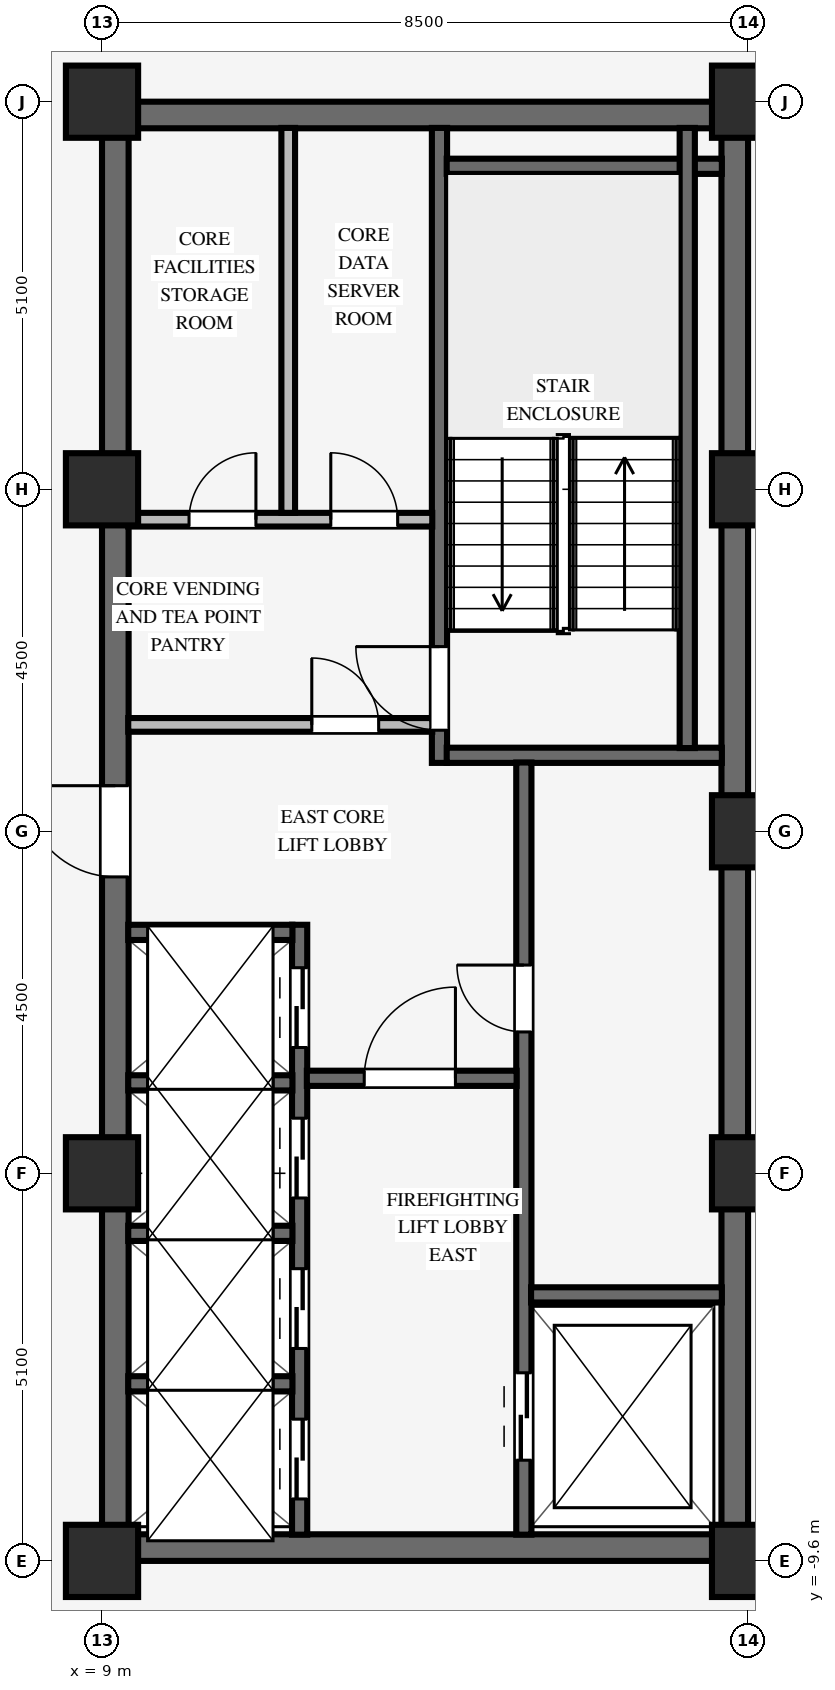
"""IFC4 building model, lengths in metres.
Left out: names, types, materials, properties, quantities, classifications, styles, units other than length and angle.
Written with IfcOpenShell. Run it as: python <this file> out.ifc"""

import sys

from ifc_helpers import new_model, si_unit, direction, frame, frame_2d, origin, origin_2d, place, context, subcontext, project, spatial, rectangle, extrude, source, transform, mapped, element, fill, save


model = new_model("IFC4")
c1 = context("Model", 3, precision=1e-05, world=origin(), true_north=direction((0.0, 1.0)))
c2 = subcontext(c1, "Body", "Model", "MODEL_VIEW")
j1 = project(units=[si_unit("LENGTHUNIT", "METRE"), si_unit("PLANEANGLEUNIT", "RADIAN")], contexts=[c1])
p1 = place(None, origin())
s1 = spatial("IfcSite", under=j1, at=p1, CompositionType="ELEMENT")
p2 = place(p1, origin())
s2 = spatial("IfcBuilding", under=s1, at=p2, CompositionType="ELEMENT")
p3 = place(p2, frame((0.0, 0.0, 201.85)))
s3 = spatial("IfcBuildingStorey", under=s2, at=p3, CompositionType="ELEMENT", Elevation=201.85)
for number, where, z_axis, x_axis in (
    (1, (9.0, -9.425, 0.0), (0.0, 0.0, 1.0), (1.0, 0.0, 0.0)),
    (2, (9.0, 9.425, 0.0), (0.0, 0.0, 1.0), (1.0, 0.0, 0.0)),
):
    element("IfcWall", number, at=place(p3, frame(where, z_axis=z_axis, x_axis=x_axis)), inside=s3, PredefinedType="SHEAR", context=c2, shape_type="SweptSolid", body=[
        extrude(rectangle(XDim=8.5, YDim=0.35, at=frame_2d((4.25, 0.0))), origin(), (0.0, 0.0, 1.0), 3.37),
    ])
p4 = place(p3, frame((9.175, -9.255, 0.0), z_axis=(0.0, 0.0, 1.0), x_axis=(0.0, 1.0, 0.0)))
e3 = element("IfcWall", 3, at=p4, inside=s3, PredefinedType="SHEAR", context=c2, shape_type="SweptSolid", body=[
    extrude(rectangle(XDim=18.51, YDim=0.35, at=frame_2d((9.255, 0.0))), origin(), (0.0, 0.0, 1.0), 3.37),
])
p5 = place(p4, frame((8.655, 0.0, 0.0)))
e4 = element("IfcOpeningElement", 4, at=p5, cuts=e3, PredefinedType="OPENING", context=c2, shape_type="SweptSolid", body=[
    extrude(rectangle(XDim=1.2, YDim=2.15, at=frame_2d((0.6, 1.075))), frame((0.0, 0.185, 0.0), z_axis=(0.0, -1.0, 0.0), x_axis=(1.0, 0.0, 0.0)), (0.0, 0.0, 1.0), 0.37),
])
p6 = place(p3, frame((17.325, -9.255, 0.0), z_axis=(0.0, 0.0, 1.0), x_axis=(0.0, 1.0, 0.0)))
e5 = element("IfcWall", 5, at=p6, inside=s3, PredefinedType="SHEAR", context=c2, shape_type="SweptSolid", body=[
    extrude(rectangle(XDim=18.51, YDim=0.35, at=frame_2d((9.255, 0.0))), origin(), (0.0, 0.0, 1.0), 3.37),
])
for number, where, z_axis, x_axis in (
    (6, (9.0, -9.6, 0.0), (0.0, 0.0, 1.0), (1.0, 0.0, 0.0)),
    (7, (9.0, -4.5, 0.0), (0.0, 0.0, 1.0), (1.0, 0.0, 0.0)),
    (8, (9.0, 4.5, 0.0), (0.0, 0.0, 1.0), (1.0, 0.0, 0.0)),
    (9, (9.0, 9.6, 0.0), (0.0, 0.0, 1.0), (1.0, 0.0, 0.0)),
    (10, (17.5, -9.6, 0.0), (0.0, 0.0, 1.0), (1.0, 0.0, 0.0)),
    (11, (17.5, -4.5, 0.0), (0.0, 0.0, 1.0), (1.0, 0.0, 0.0)),
    (12, (17.5, 4.5, 0.0), (0.0, 0.0, 1.0), (1.0, 0.0, 0.0)),
    (13, (17.5, 9.6, 0.0), (0.0, 0.0, 1.0), (1.0, 0.0, 0.0)),
    (14, (17.5, 0.0, 0.0), (0.0, 0.0, 1.0), (1.0, 0.0, 0.0)),
):
    element("IfcColumn", number, at=place(p3, frame(where, z_axis=z_axis, x_axis=x_axis)), inside=s3, PredefinedType="COLUMN", context=c2, shape_type="SweptSolid", body=[
        extrude(rectangle(XDim=0.95, YDim=0.95, at=origin_2d()), origin(), (0.0, 0.0, 1.0), 3.37),
    ])
p7 = place(p3, frame((13.44, 0.9, 0.0), z_axis=(0.0, 0.0, 1.0), x_axis=(0.0, 1.0, 0.0)))
e15 = element("IfcWall", 15, at=p7, inside=s3, PredefinedType="SHEAR", context=c2, shape_type="SweptSolid", body=[
    extrude(rectangle(XDim=8.355, YDim=0.2, at=frame_2d((4.177, 0.0))), origin(), (0.0, 0.0, 1.0), 3.37),
])
p8 = place(p7, frame((0.43, 0.0, 0.0)))
e16 = element("IfcOpeningElement", 16, at=p8, cuts=e15, PredefinedType="OPENING", context=c2, shape_type="SweptSolid", body=[
    extrude(rectangle(XDim=1.1, YDim=2.15, at=frame_2d((0.55, 1.075))), frame((0.0, 0.11, 0.0), z_axis=(0.0, -1.0, 0.0), x_axis=(1.0, 0.0, 0.0)), (0.0, 0.0, 1.0), 0.22),
])
for number, where, z_axis, x_axis in (
    (17, (13.535, 1.0, 0.0), (0.0, 0.0, 1.0), (1.0, 0.0, 0.0)),
    (18, (13.535, 8.75, 0.0), (0.0, 0.0, 1.0), (1.0, 0.0, 0.0)),
):
    element("IfcWall", number, at=place(p3, frame(where, z_axis=z_axis, x_axis=x_axis)), inside=s3, PredefinedType="SHEAR", context=c2, shape_type="SweptSolid", body=[
        extrude(rectangle(XDim=3.62, YDim=0.2, at=frame_2d((1.81, 0.0))), origin(), (0.0, 0.0, 1.0), 3.37),
    ])
p9 = place(p3, frame((16.7, 1.095, 0.0), z_axis=(0.0, 0.0, 1.0), x_axis=(0.0, 1.0, 0.0)))
e19 = element("IfcWall", 19, at=p9, inside=s3, PredefinedType="SHEAR", context=c2, shape_type="SweptSolid", body=[
    extrude(rectangle(XDim=8.16, YDim=0.2, at=frame_2d((4.08, 0.0))), origin(), (0.0, 0.0, 1.0), 3.37),
])
p10 = place(p3, frame((14.55, -9.255, 0.0), z_axis=(0.0, 0.0, 1.0), x_axis=(0.0, 1.0, 0.0)))
e20 = element("IfcWall", 20, at=p10, inside=s3, PredefinedType="SHEAR", context=c2, shape_type="SweptSolid", body=[
    extrude(rectangle(XDim=10.16, YDim=0.2, at=frame_2d((5.08, 0.0))), origin(), (0.0, 0.0, 1.0), 3.37),
])
p11 = place(p10, frame((6.615, 0.0, 0.0)))
e21 = element("IfcOpeningElement", 21, at=p11, cuts=e20, PredefinedType="OPENING", context=c2, shape_type="SweptSolid", body=[
    extrude(rectangle(XDim=0.88, YDim=2.1, at=frame_2d((0.44, 1.05))), frame((0.0, 0.11, 0.0), z_axis=(0.0, -1.0, 0.0), x_axis=(1.0, 0.0, 0.0)), (0.0, 0.0, 1.0), 0.22),
])
p12 = place(p10, frame((0.98, 0.0, 0.0)))
e22 = element("IfcOpeningElement", 22, at=p12, cuts=e20, PredefinedType="OPENING", context=c2, shape_type="SweptSolid", body=[
    extrude(rectangle(XDim=1.15, YDim=2.15, at=frame_2d((0.575, 1.075))), frame((0.0, 0.11, 0.0), z_axis=(0.0, -1.0, 0.0), x_axis=(1.0, 0.0, 0.0)), (0.0, 0.0, 1.0), 0.22),
])
p13 = place(p3, frame((14.645, -6.1, 0.0), z_axis=(0.0, 0.0, 1.0), x_axis=(1.0, 0.0, 0.0)))
e23 = element("IfcWall", 23, at=p13, inside=s3, PredefinedType="SHEAR", context=c2, shape_type="SweptSolid", body=[
    extrude(rectangle(XDim=2.51, YDim=0.2, at=frame_2d((1.255, 0.0))), origin(), (0.0, 0.0, 1.0), 3.37),
])
p14 = place(p3, frame((11.6, -9.255, 0.0), z_axis=(0.0, 0.0, 1.0), x_axis=(0.0, 1.0, 0.0)))
e24 = element("IfcWall", 24, at=p14, inside=s3, PredefinedType="SHEAR", context=c2, shape_type="SweptSolid", body=[
    extrude(rectangle(XDim=8.025, YDim=0.2, at=frame_2d((4.012, 0.0))), origin(), (0.0, 0.0, 1.0), 3.37),
])
p15 = place(p14, frame((0.47, 0.0, 0.0)))
e25 = element("IfcOpeningElement", 25, at=p15, cuts=e24, PredefinedType="OPENING", context=c2, shape_type="SweptSolid", body=[
    extrude(rectangle(XDim=1.05, YDim=2.15, at=frame_2d((0.525, 1.075))), frame((0.0, 0.11, 0.0), z_axis=(0.0, -1.0, 0.0), x_axis=(1.0, 0.0, 0.0)), (0.0, 0.0, 1.0), 0.22),
])
p16 = place(p14, frame((2.45, 0.0, 0.0)))
e26 = element("IfcOpeningElement", 26, at=p16, cuts=e24, PredefinedType="OPENING", context=c2, shape_type="SweptSolid", body=[
    extrude(rectangle(XDim=1.05, YDim=2.15, at=frame_2d((0.525, 1.075))), frame((0.0, 0.11, 0.0), z_axis=(0.0, -1.0, 0.0), x_axis=(1.0, 0.0, 0.0)), (0.0, 0.0, 1.0), 0.22),
])
p17 = place(p14, frame((4.43, 0.0, 0.0)))
e27 = element("IfcOpeningElement", 27, at=p17, cuts=e24, PredefinedType="OPENING", context=c2, shape_type="SweptSolid", body=[
    extrude(rectangle(XDim=1.05, YDim=2.15, at=frame_2d((0.525, 1.075))), frame((0.0, 0.11, 0.0), z_axis=(0.0, -1.0, 0.0), x_axis=(1.0, 0.0, 0.0)), (0.0, 0.0, 1.0), 0.22),
])
p18 = place(p14, frame((6.41, 0.0, 0.0)))
e28 = element("IfcOpeningElement", 28, at=p18, cuts=e24, PredefinedType="OPENING", context=c2, shape_type="SweptSolid", body=[
    extrude(rectangle(XDim=1.05, YDim=2.15, at=frame_2d((0.525, 1.075))), frame((0.0, 0.11, 0.0), z_axis=(0.0, -1.0, 0.0), x_axis=(1.0, 0.0, 0.0)), (0.0, 0.0, 1.0), 0.22),
])
p19 = place(p3, frame((11.695, -3.25, 0.0), z_axis=(0.0, 0.0, 1.0), x_axis=(1.0, 0.0, 0.0)))
e29 = element("IfcWall", 29, at=p19, inside=s3, PredefinedType="SHEAR", context=c2, shape_type="SweptSolid", body=[
    extrude(rectangle(XDim=2.76, YDim=0.2, at=frame_2d((1.38, 0.0))), origin(), (0.0, 0.0, 1.0), 3.37),
])
p20 = place(p19, frame((0.755, 0.0, 0.0)))
e30 = element("IfcOpeningElement", 30, at=p20, cuts=e29, PredefinedType="OPENING", context=c2, shape_type="SweptSolid", body=[
    extrude(rectangle(XDim=1.2, YDim=2.15, at=frame_2d((0.6, 1.075))), frame((0.0, 0.11, 0.0), z_axis=(0.0, -1.0, 0.0), x_axis=(1.0, 0.0, 0.0)), (0.0, 0.0, 1.0), 0.22),
])
for number, where, z_axis, x_axis in (
    (31, (9.345, -7.27, 0.0), (0.0, 0.0, 1.0), (1.0, 0.0, 0.0)),
    (32, (9.345, -5.29, 0.0), (0.0, 0.0, 1.0), (1.0, 0.0, 0.0)),
    (33, (9.345, -3.31, 0.0), (0.0, 0.0, 1.0), (1.0, 0.0, 0.0)),
    (34, (9.345, -1.33, 0.0), (0.0, 0.0, 1.0), (1.0, 0.0, 0.0)),
):
    element("IfcWall", number, at=place(p3, frame(where, z_axis=z_axis, x_axis=x_axis)), inside=s3, PredefinedType="SHEAR", context=c2, shape_type="SweptSolid", body=[
        extrude(rectangle(XDim=2.16, YDim=0.2, at=frame_2d((1.08, 0.0))), origin(), (0.0, 0.0, 1.0), 3.37),
    ])
p21 = place(p3, frame((9.345, 1.4, 0.0), z_axis=(0.0, 0.0, 1.0), x_axis=(1.0, 0.0, 0.0)))
e35 = element("IfcWall", 35, at=p21, inside=s3, PredefinedType="PARTITIONING", context=c2, shape_type="SweptSolid", body=[
    extrude(rectangle(XDim=4.0, YDim=0.18, at=frame_2d((2.0, 0.0))), origin(), (0.0, 0.0, 1.0), 3.36),
])
p22 = place(p21, frame((2.415, 0.0, 0.0)))
e36 = element("IfcOpeningElement", 36, at=p22, cuts=e35, PredefinedType="OPENING", context=c2, shape_type="SweptSolid", body=[
    extrude(rectangle(XDim=0.88, YDim=2.1, at=frame_2d((0.44, 1.05))), frame((0.0, 0.1, 0.0), z_axis=(0.0, -1.0, 0.0), x_axis=(1.0, 0.0, 0.0)), (0.0, 0.0, 1.0), 0.2),
])
p23 = place(p3, frame((9.345, 4.1, 0.0), z_axis=(0.0, 0.0, 1.0), x_axis=(1.0, 0.0, 0.0)))
e37 = element("IfcWall", 37, at=p23, inside=s3, PredefinedType="PARTITIONING", context=c2, shape_type="SweptSolid", body=[
    extrude(rectangle(XDim=4.0, YDim=0.18, at=frame_2d((2.0, 0.0))), origin(), (0.0, 0.0, 1.0), 3.36),
])
p24 = place(p23, frame((0.8, 0.0, 0.0)))
e38 = element("IfcOpeningElement", 38, at=p24, cuts=e37, PredefinedType="OPENING", context=c2, shape_type="SweptSolid", body=[
    extrude(rectangle(XDim=0.88, YDim=2.1, at=frame_2d((0.44, 1.05))), frame((0.0, 0.1, 0.0), z_axis=(0.0, -1.0, 0.0), x_axis=(1.0, 0.0, 0.0)), (0.0, 0.0, 1.0), 0.2),
])
p25 = place(p23, frame((2.665, 0.0, 0.0)))
e39 = element("IfcOpeningElement", 39, at=p25, cuts=e37, PredefinedType="OPENING", context=c2, shape_type="SweptSolid", body=[
    extrude(rectangle(XDim=0.88, YDim=2.1, at=frame_2d((0.44, 1.05))), frame((0.0, 0.1, 0.0), z_axis=(0.0, -1.0, 0.0), x_axis=(1.0, 0.0, 0.0)), (0.0, 0.0, 1.0), 0.2),
])
p26 = place(p3, frame((11.45, 4.19, 0.0), z_axis=(0.0, 0.0, 1.0), x_axis=(0.0, 1.0, 0.0)))
e40 = element("IfcWall", 40, at=p26, inside=s3, PredefinedType="PARTITIONING", context=c2, shape_type="SweptSolid", body=[
    extrude(rectangle(XDim=5.065, YDim=0.18, at=frame_2d((2.532, 0.0))), origin(), (0.0, 0.0, 1.0), 3.36),
])
m1 = source(origin(), c2, "Body", "SweptSolid", [
    extrude(rectangle(XDim=1.1, YDim=2.15, at=frame_2d((0.55, 1.075))), frame((0.0, 0.025, 0.0), z_axis=(0.0, -1.0, 0.0), x_axis=(1.0, 0.0, 0.0)), (0.0, 0.0, 1.0), 0.05),
])
p27 = place(p8, origin())
e41 = element("IfcDoor", 41, at=p27, inside=s3, OperationType="SINGLE_SWING_RIGHT", PredefinedType="DOOR", context=c2, shape_type="MappedRepresentation", body=[
    mapped(m1, transform((0.0, 0.0, 0.0), scale=1.0)),
])
fill(e16, e41)
m2 = source(origin(), c2, "Body", "SweptSolid", [
    extrude(rectangle(XDim=0.88, YDim=2.1, at=frame_2d((0.44, 1.05))), frame((0.0, 0.025, 0.0), z_axis=(0.0, -1.0, 0.0), x_axis=(1.0, 0.0, 0.0)), (0.0, 0.0, 1.0), 0.05),
])
p28 = place(p11, origin())
e42 = element("IfcDoor", 42, at=p28, inside=s3, OperationType="SINGLE_SWING_RIGHT", PredefinedType="DOOR", context=c2, shape_type="MappedRepresentation", body=[
    mapped(m2, transform((0.0, 0.0, 0.0), scale=1.0)),
])
fill(e21, e42)
m3 = source(origin(), c2, "Body", "SweptSolid", [
    extrude(rectangle(XDim=1.2, YDim=2.15, at=frame_2d((0.6, 1.075))), frame((0.0, 0.025, 0.0), z_axis=(0.0, -1.0, 0.0), x_axis=(1.0, 0.0, 0.0)), (0.0, 0.0, 1.0), 0.05),
])
p29 = place(p20, origin())
e43 = element("IfcDoor", 43, at=p29, inside=s3, OperationType="SINGLE_SWING_RIGHT", PredefinedType="DOOR", context=c2, shape_type="MappedRepresentation", body=[
    mapped(m3, transform((0.0, 0.0, 0.0), scale=1.0)),
])
fill(e30, e43)
p30 = place(p5, origin())
e44 = element("IfcDoor", 44, at=p30, inside=s3, OperationType="SINGLE_SWING_RIGHT", PredefinedType="DOOR", context=c2, shape_type="MappedRepresentation", body=[
    mapped(m3, transform((0.0, 0.0, 0.0), scale=1.0)),
])
fill(e4, e44)
p31 = place(p22, origin())
e45 = element("IfcDoor", 45, at=p31, inside=s3, OperationType="SINGLE_SWING_LEFT", PredefinedType="DOOR", context=c2, shape_type="MappedRepresentation", body=[
    mapped(m2, transform((0.0, 0.0, 0.0), scale=1.0)),
])
fill(e36, e45)
p32 = place(p24, origin())
e46 = element("IfcDoor", 46, at=p32, inside=s3, OperationType="SINGLE_SWING_RIGHT", PredefinedType="DOOR", context=c2, shape_type="MappedRepresentation", body=[
    mapped(m2, transform((0.0, 0.0, 0.0), scale=1.0)),
])
fill(e38, e46)
p33 = place(p25, origin())
e47 = element("IfcDoor", 47, at=p33, inside=s3, OperationType="SINGLE_SWING_LEFT", PredefinedType="DOOR", context=c2, shape_type="MappedRepresentation", body=[
    mapped(m2, transform((0.0, 0.0, 0.0), scale=1.0)),
])
fill(e39, e47)
m4 = source(origin(), c2, "Body", "SweptSolid", [
    extrude(rectangle(XDim=1.15, YDim=2.15, at=frame_2d((0.575, 1.075))), frame((0.0, 0.025, 0.0), z_axis=(0.0, -1.0, 0.0), x_axis=(1.0, 0.0, 0.0)), (0.0, 0.0, 1.0), 0.05),
])
p34 = place(p12, origin())
e48 = element("IfcDoor", 48, at=p34, inside=s3, OperationType="DOUBLE_DOOR_SLIDING", PredefinedType="DOOR", context=c2, shape_type="MappedRepresentation", body=[
    mapped(m4, transform((0.0, 0.0, 0.0), scale=1.0)),
])
fill(e22, e48)
m5 = source(origin(), c2, "Body", "SweptSolid", [
    extrude(rectangle(XDim=1.05, YDim=2.15, at=frame_2d((0.525, 1.075))), frame((0.0, 0.025, 0.0), z_axis=(0.0, -1.0, 0.0), x_axis=(1.0, 0.0, 0.0)), (0.0, 0.0, 1.0), 0.05),
])
p35 = place(p15, origin())
e49 = element("IfcDoor", 49, at=p35, inside=s3, OperationType="DOUBLE_DOOR_SLIDING", PredefinedType="DOOR", context=c2, shape_type="MappedRepresentation", body=[
    mapped(m5, transform((0.0, 0.0, 0.0), scale=1.0)),
])
fill(e25, e49)
p36 = place(p16, origin())
e50 = element("IfcDoor", 50, at=p36, inside=s3, OperationType="DOUBLE_DOOR_SLIDING", PredefinedType="DOOR", context=c2, shape_type="MappedRepresentation", body=[
    mapped(m5, transform((0.0, 0.0, 0.0), scale=1.0)),
])
fill(e26, e50)
p37 = place(p17, origin())
e51 = element("IfcDoor", 51, at=p37, inside=s3, OperationType="DOUBLE_DOOR_SLIDING", PredefinedType="DOOR", context=c2, shape_type="MappedRepresentation", body=[
    mapped(m5, transform((0.0, 0.0, 0.0), scale=1.0)),
])
fill(e27, e51)
p38 = place(p18, origin())
e52 = element("IfcDoor", 52, at=p38, inside=s3, OperationType="DOUBLE_DOOR_SLIDING", PredefinedType="DOOR", context=c2, shape_type="MappedRepresentation", body=[
    mapped(m5, transform((0.0, 0.0, 0.0), scale=1.0)),
])
fill(e28, e52)
save(model, sys.argv[1])
